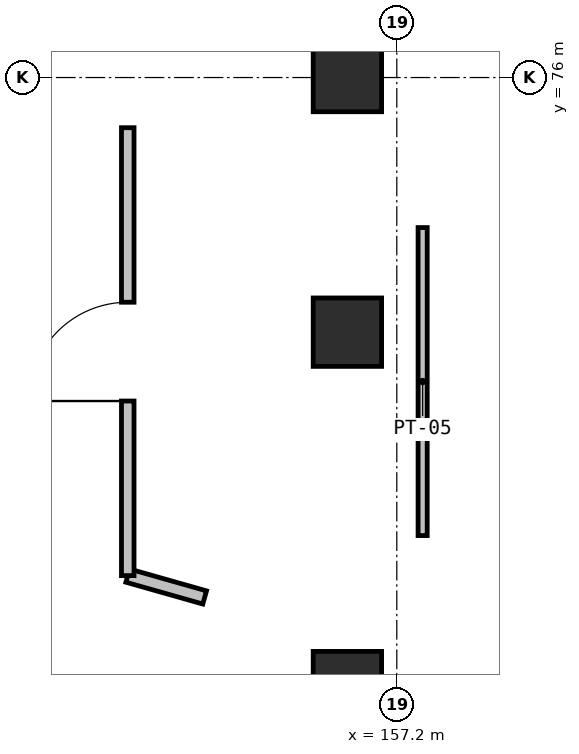
"""IFC4 building model, lengths in metres.
Left out: names, types, materials, properties, quantities, classifications, styles, units other than length and angle.
Written with IfcOpenShell. Run it as: python <this file> out.ifc"""

import sys

from ifc_helpers import new_model, si_unit, direction, frame, frame_2d, origin, origin_2d, place, context, subcontext, project, spatial, rectangle, extrude, element, fill, save


model = new_model("IFC4")
c1 = context("Model", 3, precision=1e-05, world=origin(), true_north=direction((0.0, 1.0)))
c2 = subcontext(c1, "Body", "Model", "MODEL_VIEW")
j1 = project(units=[si_unit("LENGTHUNIT", "METRE"), si_unit("PLANEANGLEUNIT", "RADIAN")], contexts=[c1])
p1 = place(None, origin())
s1 = spatial("IfcSite", under=j1, at=p1, CompositionType="ELEMENT")
p2 = place(p1, origin())
s2 = spatial("IfcBuilding", under=s1, at=p2, CompositionType="ELEMENT")
p3 = place(p2, frame((0.0, 0.0, -4.8)))
s3 = spatial("IfcBuildingStorey", under=s2, at=p3, CompositionType="ELEMENT", Elevation=-4.8)
for number, where, z_axis, x_axis in (
    (1, (156.55, 68.0, 0.0), (0.0, 0.0, 1.0), (1.0, 0.0, 0.0)),
    (2, (156.55, 72.65, 0.0), (0.0, 0.0, 1.0), (1.0, 0.0, 0.0)),
    (3, (156.55, 76.0, 0.0), (0.0, 0.0, 1.0), (1.0, 0.0, 0.0)),
):
    element("IfcColumn", number, at=place(p3, frame(where, z_axis=z_axis, x_axis=x_axis)), inside=s3, PredefinedType="COLUMN", context=c2, shape_type="SweptSolid", body=[
        extrude(rectangle(XDim=0.9, YDim=0.9, at=origin_2d()), origin(), (0.0, 0.0, 1.0), 4.8),
    ])
p4 = place(p3, frame((157.54, 74.026, 0.0), z_axis=(0.0, 0.0, 1.0), x_axis=(0.0, -1.0, 0.0)))
e4 = element("IfcWall", 4, at=p4, inside=s3, PredefinedType="PARTITIONING", context=c2, shape_type="SweptSolid", body=[
    extrude(rectangle(XDim=4.052, YDim=0.12, at=frame_2d((2.026, 0.0))), origin(), (0.0, 0.0, 1.0), 4.45),
])
p5 = place(p3, frame((154.672, 69.16, 0.0), z_axis=(0.0, 0.0, 1.0), x_axis=(-0.962047568244, 0.272881799386, 0.0)))
e5 = element("IfcWall", 5, at=p5, inside=s3, PredefinedType="PARTITIONING", context=c2, shape_type="SweptSolid", body=[
    extrude(rectangle(XDim=1.052, YDim=0.18, at=frame_2d((0.526, 0.0))), origin(), (0.0, 0.0, 1.0), 4.45),
])
p6 = place(p3, frame((153.66, 69.447, 0.0), z_axis=(0.0, 0.0, 1.0), x_axis=(0.0, 1.0, 0.0)))
e6 = element("IfcWall", 6, at=p6, inside=s3, PredefinedType="PARTITIONING", context=c2, shape_type="SweptSolid", body=[
    extrude(rectangle(XDim=5.893, YDim=0.165, at=frame_2d((2.947, 0.0))), origin(), (0.0, 0.0, 1.0), 4.45),
])
p7 = place(p6, frame((2.297, 0.0, 0.0)))
e7 = element("IfcOpeningElement", 7, at=p7, cuts=e6, PredefinedType="OPENING", context=c2, shape_type="SweptSolid", body=[
    extrude(rectangle(XDim=1.3, YDim=2.15, at=frame_2d((0.65, 1.075))), frame((0.0, 0.093, 0.0), z_axis=(0.0, -1.0, 0.0), x_axis=(1.0, 0.0, 0.0)), (0.0, 0.0, 1.0), 0.185),
])
p8 = place(p7, origin())
e8 = element("IfcDoor", 8, at=p8, inside=s3, OperationType="SINGLE_SWING_RIGHT", PredefinedType="DOOR", context=c2, shape_type="SweptSolid", body=[
    extrude(rectangle(XDim=1.3, YDim=2.15, at=frame_2d((0.65, 1.075))), frame((0.0, 0.025, 0.0), z_axis=(0.0, -1.0, 0.0), x_axis=(1.0, 0.0, 0.0)), (0.0, 0.0, 1.0), 0.05),
])
fill(e7, e8)
save(model, sys.argv[1])
